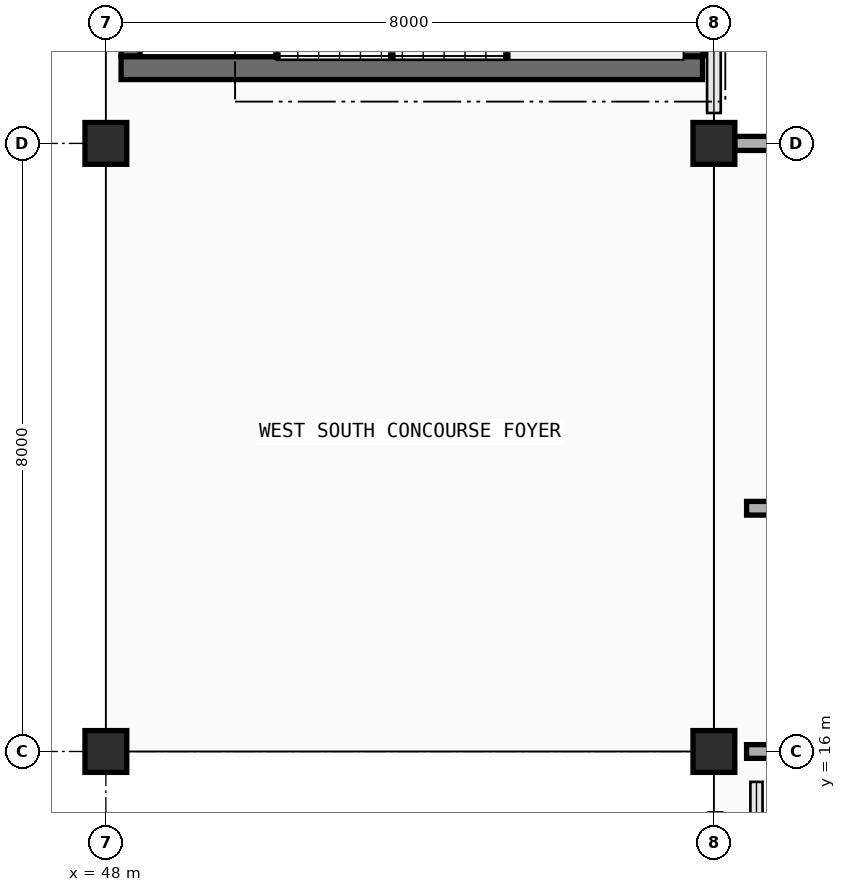
"""IFC4 building model, lengths in metres.
Left out: names, types, materials, properties, quantities, classifications, styles, units other than length and angle.
Written with IfcOpenShell. Run it as: python <this file> out.ifc"""

import sys

from ifc_helpers import new_model, si_unit, direction, frame, frame_2d, origin, origin_2d, place, context, subcontext, project, spatial, rectangle, extrude, element, save


model = new_model("IFC4")
c1 = context("Model", 3, precision=1e-05, world=origin(), true_north=direction((0.0, 1.0)))
c2 = subcontext(c1, "Body", "Model", "MODEL_VIEW")
j1 = project(units=[si_unit("LENGTHUNIT", "METRE"), si_unit("PLANEANGLEUNIT", "RADIAN")], contexts=[c1])
p1 = place(None, origin())
s1 = spatial("IfcSite", under=j1, at=p1, CompositionType="ELEMENT")
p2 = place(p1, origin())
s2 = spatial("IfcBuilding", under=s1, at=p2, CompositionType="ELEMENT")
p3 = place(p2, frame((0.0, 0.0, 13.8)))
s3 = spatial("IfcBuildingStorey", under=s2, at=p3, CompositionType="ELEMENT", Elevation=13.8)
for number, where, z_axis, x_axis in (
    (1, (48.0, 16.0, 0.0), (0.0, 0.0, 1.0), (1.0, 0.0, 0.0)),
    (2, (56.0, 16.0, 0.0), (0.0, 0.0, 1.0), (1.0, 0.0, 0.0)),
    (3, (48.0, 24.0, 0.0), (0.0, 0.0, 1.0), (1.0, 0.0, 0.0)),
    (4, (56.0, 24.0, 0.0), (0.0, 0.0, 1.0), (1.0, 0.0, 0.0)),
):
    element("IfcColumn", number, at=place(p3, frame(where, z_axis=z_axis, x_axis=x_axis)), inside=s3, PredefinedType="COLUMN", context=c2, shape_type="SweptSolid", body=[
        extrude(rectangle(XDim=0.55, YDim=0.55, at=origin_2d()), origin(), (0.0, 0.0, 1.0), 4.2),
    ])
p4 = place(p3, frame((56.272, 24.0, 0.0), z_axis=(0.0, 0.0, 1.0), x_axis=(1.0, 0.0, 0.0)))
e5 = element("IfcWall", 5, at=p4, inside=s3, PredefinedType="STANDARD", context=c2, shape_type="SweptSolid", body=[
    extrude(rectangle(XDim=7.456, YDim=0.185, at=frame_2d((3.728, 0.0))), origin(), (0.0, 0.0, 1.0), 3.35),
])
p5 = place(p4, frame((2.308, 0.0, 0.9)))
e6 = element("IfcOpeningElement", 6, at=p5, cuts=e5, PredefinedType="OPENING", context=c2, shape_type="SweptSolid", body=[
    extrude(rectangle(XDim=1.45, YDim=1.4, at=frame_2d((0.725, 0.7))), frame((0.0, 0.103, 0.0), z_axis=(0.0, -1.0, 0.0), x_axis=(1.0, 0.0, 0.0)), (0.0, 0.0, 1.0), 0.205),
])
p6 = place(p3, frame((56.24, 15.78, 0.0), z_axis=(0.0, 0.0, 1.0), x_axis=(1.0, 0.0, 0.0)))
e7 = element("IfcWall", 7, at=p6, inside=s3, PredefinedType="PARAPET", context=c2, shape_type="SweptSolid", body=[
    extrude(rectangle(XDim=0.32, YDim=0.2, at=frame_2d((0.16, 0.0))), origin(), (0.0, 0.0, 1.0), 3.35),
])
p7 = place(p3, frame((48.0, 15.8, -0.02), z_axis=(0.0, 0.0, 1.0), x_axis=(0.0, -1.0, 0.0)))
e8 = element("IfcWall", 8, at=p7, inside=s3, PredefinedType="PARAPET", context=c2, shape_type="SweptSolid", body=[
    extrude(rectangle(XDim=3.95, YDim=0.2, at=frame_2d((1.975, 0.0))), origin(), (0.0, 0.0, 1.0), 1.991),
])
p8 = place(p3, frame((48.2, 24.99, 0.0), z_axis=(0.0, 0.0, 1.0), x_axis=(1.0, 0.0, 0.0)))
e9 = element("IfcWall", 9, at=p8, inside=s3, PredefinedType="SHEAR", context=c2, shape_type="SweptSolid", body=[
    extrude(rectangle(XDim=7.65, YDim=0.3, at=frame_2d((3.825, 0.0))), origin(), (0.0, 0.0, 1.0), 4.2),
])
p9 = place(p3, frame((55.71, 25.15, 0.0), z_axis=(0.0, 0.0, 1.0), x_axis=(0.0, 1.0, 0.0)))
e10 = element("IfcWall", 10, at=p9, inside=s3, PredefinedType="SHEAR", context=c2, shape_type="SweptSolid", body=[
    extrude(rectangle(XDim=3.36, YDim=0.3, at=frame_2d((1.68, 0.0))), origin(), (0.0, 0.0, 1.0), 4.2),
])
p10 = place(p3, frame((48.325, 25.15, 0.0), z_axis=(0.0, 0.0, 1.0), x_axis=(0.0, 1.0, 0.0)))
e11 = element("IfcWall", 11, at=p10, inside=s3, PredefinedType="SOLIDWALL", context=c2, shape_type="SweptSolid", body=[
    extrude(rectangle(XDim=3.36, YDim=0.25, at=frame_2d((1.68, 0.0))), origin(), (0.0, 0.0, 1.0), 4.2),
])
p11 = place(p3, frame((56.43, 16.0, 0.0), z_axis=(0.0, 0.0, 1.0), x_axis=(1.0, 0.0, 0.0)))
e12 = element("IfcWall", 12, at=p11, inside=s3, PredefinedType="PARTITIONING", context=c2, shape_type="SweptSolid", body=[
    extrude(rectangle(XDim=31.14, YDim=0.18, at=frame_2d((15.57, 0.0))), origin(), (0.0, 0.0, 1.0), 3.275),
])
p12 = place(p11, frame((3.11, 0.0, 0.0)))
e13 = element("IfcOpeningElement", 13, at=p12, cuts=e12, PredefinedType="OPENING", context=c2, shape_type="SweptSolid", body=[
    extrude(rectangle(XDim=0.92, YDim=2.15, at=frame_2d((0.46, 1.075))), frame((0.0, 0.1, 0.0), z_axis=(0.0, -1.0, 0.0), x_axis=(1.0, 0.0, 0.0)), (0.0, 0.0, 1.0), 0.2),
])
p13 = place(p11, frame((26.68, 0.0, 0.0)))
e14 = element("IfcOpeningElement", 14, at=p13, cuts=e12, PredefinedType="OPENING", context=c2, shape_type="SweptSolid", body=[
    extrude(rectangle(XDim=0.92, YDim=2.15, at=frame_2d((0.46, 1.075))), frame((0.0, 0.1, 0.0), z_axis=(0.0, -1.0, 0.0), x_axis=(1.0, 0.0, 0.0)), (0.0, 0.0, 1.0), 0.2),
])
p14 = place(p3, frame((56.43, 19.2, 0.0), z_axis=(0.0, 0.0, 1.0), x_axis=(1.0, 0.0, 0.0)))
e15 = element("IfcWall", 15, at=p14, inside=s3, PredefinedType="PARTITIONING", context=c2, shape_type="SweptSolid", body=[
    extrude(rectangle(XDim=15.14, YDim=0.18, at=frame_2d((7.57, 0.0))), origin(), (0.0, 0.0, 1.0), 3.3),
])
p15 = place(p14, frame((3.0, 0.0, 0.0)))
e16 = element("IfcOpeningElement", 16, at=p15, cuts=e15, PredefinedType="OPENING", context=c2, shape_type="SweptSolid", body=[
    extrude(rectangle(XDim=1.14, YDim=2.15, at=frame_2d((0.57, 1.075))), frame((0.0, 0.1, 0.0), z_axis=(0.0, -1.0, 0.0), x_axis=(1.0, 0.0, 0.0)), (0.0, 0.0, 1.0), 0.2),
])
save(model, sys.argv[1])
